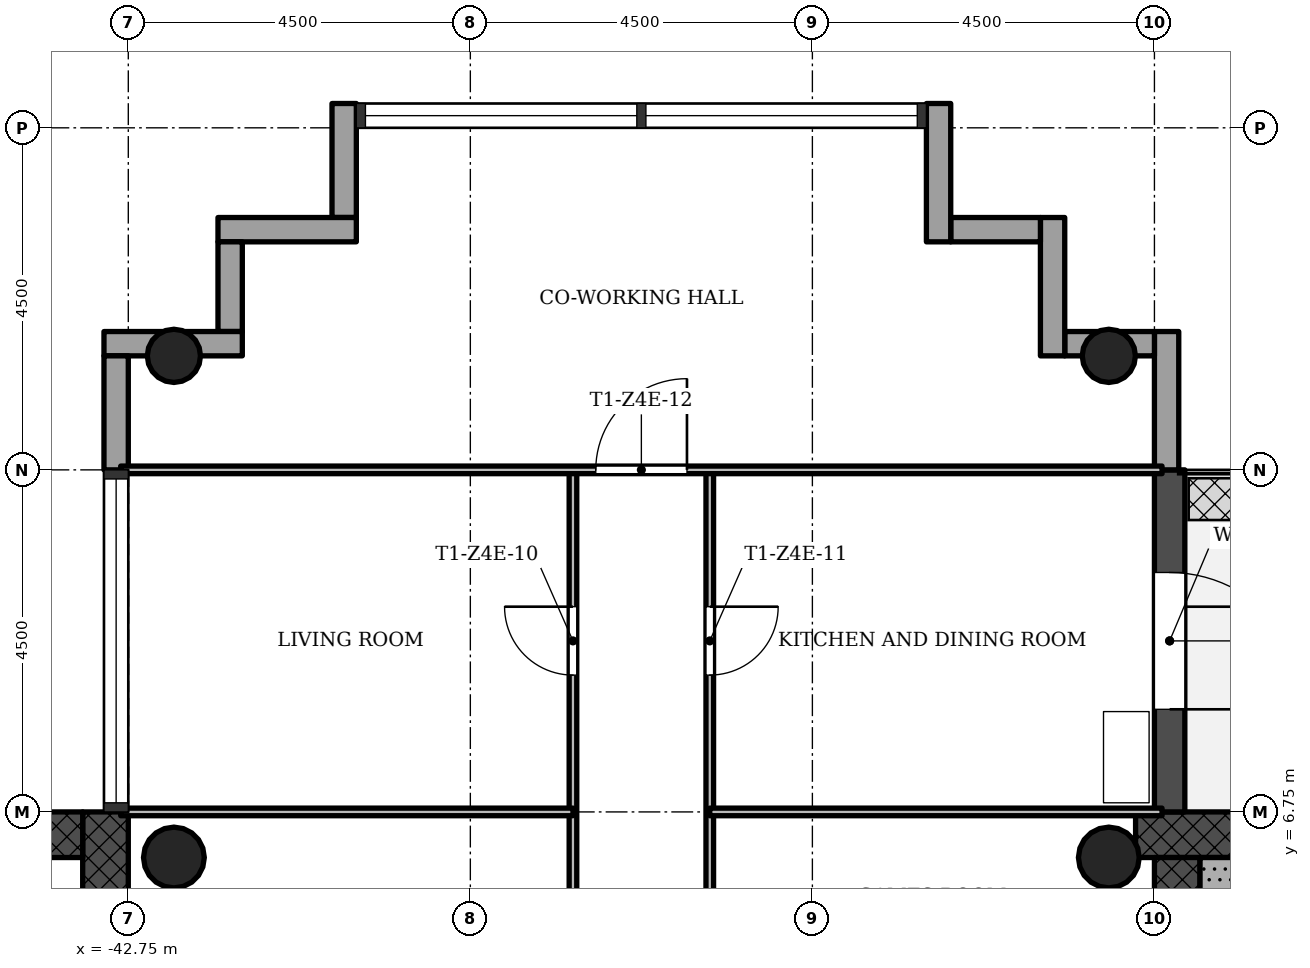
"""IFC4 building model, lengths in metres.
Left out: names, types, materials, properties, quantities, classifications, styles, units other than length and angle.
Written with IfcOpenShell. Run it as: python <this file> out.ifc"""

import sys

from ifc_helpers import new_model, si_unit, direction, frame, frame_2d, origin, origin_2d, place, context, subcontext, project, spatial, rectangle, hollow_circle, extrude, element, fill, save


model = new_model("IFC4")
c1 = context("Model", 3, precision=1e-05, world=origin(), true_north=direction((0.0, 1.0)))
c2 = subcontext(c1, "Body", "Model", "MODEL_VIEW")
j1 = project(units=[si_unit("LENGTHUNIT", "METRE"), si_unit("PLANEANGLEUNIT", "RADIAN")], contexts=[c1])
p1 = place(None, origin())
s1 = spatial("IfcSite", under=j1, at=p1, CompositionType="ELEMENT")
p2 = place(p1, origin())
s2 = spatial("IfcBuilding", under=s1, at=p2, CompositionType="ELEMENT")
p3 = place(p2, frame((0.0, 0.0, 206.2)))
s3 = spatial("IfcBuildingStorey", under=s2, at=p3, CompositionType="ELEMENT", Elevation=206.2)
p4 = place(p3, frame((-20.602, 6.45, 0.0), z_axis=(0.0, 0.0, 1.0), x_axis=(-1.0, 0.0, 0.0)))
e1 = element("IfcWall", 1, at=p4, inside=s3, PredefinedType="SHEAR", context=c2, shape_type="SweptSolid", body=[
    extrude(rectangle(XDim=8.896, YDim=0.6, at=frame_2d((4.448, 0.0))), origin(), (0.0, 0.0, 1.0), 3.4),
])
p5 = place(p3, frame((-28.95, 6.15, 0.0), z_axis=(0.0, 0.0, 1.0), x_axis=(0.0, -1.0, 0.0)))
e2 = element("IfcWall", 2, at=p5, inside=s3, PredefinedType="SHEAR", context=c2, shape_type="SweptSolid", body=[
    extrude(rectangle(XDim=12.9, YDim=0.6, at=frame_2d((6.45, 0.0))), origin(), (0.0, 0.0, 1.0), 3.4),
])
p6 = place(p5, frame((5.25, 0.0, 0.0)))
e3 = element("IfcOpeningElement", 3, at=p6, cuts=e2, PredefinedType="OPENING", context=c2, shape_type="SweptSolid", body=[
    extrude(rectangle(XDim=1.8, YDim=2.1, at=frame_2d((0.9, 1.05))), frame((0.0, 0.31, 0.0), z_axis=(0.0, -1.0, 0.0), x_axis=(1.0, 0.0, 0.0)), (0.0, 0.0, 1.0), 0.62),
])
p7 = place(p3, frame((-43.05, -6.15, 0.0), z_axis=(0.0, 0.0, 1.0), x_axis=(0.0, 1.0, 0.0)))
e4 = element("IfcWall", 4, at=p7, inside=s3, PredefinedType="SHEAR", context=c2, shape_type="SweptSolid", body=[
    extrude(rectangle(XDim=12.9, YDim=0.6, at=frame_2d((6.45, 0.0))), origin(), (0.0, 0.0, 1.0), 3.4),
])
p8 = place(p7, frame((5.25, 0.0, 0.0)))
e5 = element("IfcOpeningElement", 5, at=p8, cuts=e4, PredefinedType="OPENING", context=c2, shape_type="SweptSolid", body=[
    extrude(rectangle(XDim=1.8, YDim=2.1, at=frame_2d((0.9, 1.05))), frame((0.0, 0.31, 0.0), z_axis=(0.0, -1.0, 0.0), x_axis=(1.0, 0.0, 0.0)), (0.0, 0.0, 1.0), 0.62),
])
p9 = place(p3, frame((-43.35, 6.45, 0.0), z_axis=(0.0, 0.0, 1.0), x_axis=(-1.0, 0.0, 0.0)))
e6 = element("IfcWall", 6, at=p9, inside=s3, PredefinedType="SHEAR", context=c2, shape_type="SweptSolid", body=[
    extrude(rectangle(XDim=8.4, YDim=0.6, at=frame_2d((4.2, 0.0))), origin(), (0.0, 0.0, 1.0), 3.4),
])
for number, where, z_axis, x_axis in (
    (7, (-29.85, 12.75, 0.0), (0.0, 0.0, 1.0), (1.0, 0.0, 0.0)),
    (8, (-42.15, 12.75, 0.0), (0.0, 0.0, 1.0), (1.0, 0.0, 0.0)),
):
    element("IfcColumn", number, at=place(p3, frame(where, z_axis=z_axis, x_axis=x_axis)), inside=s3, PredefinedType="COLUMN", context=c2, shape_type="SweptSolid", body=[
        extrude(hollow_circle(Radius=0.35, WallThickness=0.025, at=origin_2d()), origin(), (0.0, 0.0, 1.0), 3.4),
    ])
for number, where, z_axis, x_axis in (
    (9, (-29.85, 6.15, 0.0), (0.0, 0.0, 1.0), (1.0, 0.0, 0.0)),
    (10, (-42.15, 6.15, 0.0), (0.0, 0.0, 1.0), (1.0, 0.0, 0.0)),
):
    element("IfcColumn", number, at=place(p3, frame(where, z_axis=z_axis, x_axis=x_axis)), inside=s3, PredefinedType="COLUMN", context=c2, shape_type="SweptSolid", body=[
        extrude(hollow_circle(Radius=0.4, WallThickness=0.028, at=origin_2d()), origin(), (0.0, 0.0, 1.0), 3.4),
    ])
p10 = place(p3, frame((-29.05, 6.75, -0.02), z_axis=(0.0, 0.0, 1.0), x_axis=(0.0, 1.0, 0.0)))
e11 = element("IfcWall", 11, at=p10, inside=s3, PredefinedType="STANDARD", context=c2, shape_type="SweptSolid", body=[
    extrude(rectangle(XDim=4.5, YDim=0.4, at=frame_2d((2.25, 0.0))), origin(), (0.0, 0.0, 1.0), 3.12),
])
p11 = place(p10, frame((1.35, 0.0, 0.02)))
e12 = element("IfcOpeningElement", 12, at=p11, cuts=e11, PredefinedType="OPENING", context=c2, shape_type="SweptSolid", body=[
    extrude(rectangle(XDim=1.8, YDim=2.1, at=frame_2d((0.9, 1.05))), frame((0.0, 0.21, 0.0), z_axis=(0.0, -1.0, 0.0), x_axis=(1.0, 0.0, 0.0)), (0.0, 0.0, 1.0), 0.42),
])
p12 = place(p3, frame((-29.09, 11.25, -0.3), z_axis=(0.0, 0.0, 1.0), x_axis=(0.0, 1.0, 0.0)))
e13 = element("IfcWall", 13, at=p12, inside=s3, PredefinedType="STANDARD", context=c2, shape_type="SweptSolid", body=[
    extrude(rectangle(XDim=1.82, YDim=0.32, at=frame_2d((0.91, 0.0))), origin(), (0.0, 0.0, 1.0), 3.4),
])
p13 = place(p3, frame((-29.25, 12.91, -0.3), z_axis=(0.0, 0.0, 1.0), x_axis=(-1.0, 0.0, 0.0)))
e14 = element("IfcWall", 14, at=p13, inside=s3, PredefinedType="STANDARD", context=c2, shape_type="SweptSolid", body=[
    extrude(rectangle(XDim=1.18, YDim=0.32, at=frame_2d((0.59, 0.0))), origin(), (0.0, 0.0, 1.0), 3.4),
])
p14 = place(p3, frame((-30.59, 12.75, -0.3), z_axis=(0.0, 0.0, 1.0), x_axis=(0.0, 1.0, 0.0)))
e15 = element("IfcWall", 15, at=p14, inside=s3, PredefinedType="STANDARD", context=c2, shape_type="SweptSolid", body=[
    extrude(rectangle(XDim=1.82, YDim=0.32, at=frame_2d((0.91, 0.0))), origin(), (0.0, 0.0, 1.0), 3.4),
])
p15 = place(p3, frame((-30.75, 14.41, -0.3), z_axis=(0.0, 0.0, 1.0), x_axis=(-1.0, 0.0, 0.0)))
e16 = element("IfcWall", 16, at=p15, inside=s3, PredefinedType="STANDARD", context=c2, shape_type="SweptSolid", body=[
    extrude(rectangle(XDim=1.18, YDim=0.32, at=frame_2d((0.59, 0.0))), origin(), (0.0, 0.0, 1.0), 3.4),
])
p16 = place(p3, frame((-32.09, 14.25, -0.3), z_axis=(0.0, 0.0, 1.0), x_axis=(0.0, 1.0, 0.0)))
e17 = element("IfcWall", 17, at=p16, inside=s3, PredefinedType="STANDARD", context=c2, shape_type="SweptSolid", body=[
    extrude(rectangle(XDim=1.82, YDim=0.32, at=frame_2d((0.91, 0.0))), origin(), (0.0, 0.0, 1.0), 3.4),
])
p17 = place(p3, frame((-39.91, 16.07, -0.3), z_axis=(0.0, 0.0, 1.0), x_axis=(0.0, -1.0, 0.0)))
e18 = element("IfcWall", 18, at=p17, inside=s3, PredefinedType="STANDARD", context=c2, shape_type="SweptSolid", body=[
    extrude(rectangle(XDim=1.5, YDim=0.32, at=frame_2d((0.75, 0.0))), origin(), (0.0, 0.0, 1.0), 3.4),
])
p18 = place(p3, frame((-39.75, 14.41, -0.3), z_axis=(0.0, 0.0, 1.0), x_axis=(-1.0, 0.0, 0.0)))
e19 = element("IfcWall", 19, at=p18, inside=s3, PredefinedType="STANDARD", context=c2, shape_type="SweptSolid", body=[
    extrude(rectangle(XDim=1.82, YDim=0.32, at=frame_2d((0.91, 0.0))), origin(), (0.0, 0.0, 1.0), 3.4),
])
p19 = place(p3, frame((-41.41, 14.25, -0.3), z_axis=(0.0, 0.0, 1.0), x_axis=(0.0, -1.0, 0.0)))
e20 = element("IfcWall", 20, at=p19, inside=s3, PredefinedType="STANDARD", context=c2, shape_type="SweptSolid", body=[
    extrude(rectangle(XDim=1.18, YDim=0.32, at=frame_2d((0.59, 0.0))), origin(), (0.0, 0.0, 1.0), 3.4),
])
p20 = place(p3, frame((-41.25, 12.91, -0.3), z_axis=(0.0, 0.0, 1.0), x_axis=(-1.0, 0.0, 0.0)))
e21 = element("IfcWall", 21, at=p20, inside=s3, PredefinedType="STANDARD", context=c2, shape_type="SweptSolid", body=[
    extrude(rectangle(XDim=1.82, YDim=0.32, at=frame_2d((0.91, 0.0))), origin(), (0.0, 0.0, 1.0), 3.4),
])
p21 = place(p3, frame((-42.91, 12.75, -0.3), z_axis=(0.0, 0.0, 1.0), x_axis=(0.0, -1.0, 0.0)))
e22 = element("IfcWall", 22, at=p21, inside=s3, PredefinedType="STANDARD", context=c2, shape_type="SweptSolid", body=[
    extrude(rectangle(XDim=1.5, YDim=0.32, at=frame_2d((0.75, 0.0))), origin(), (0.0, 0.0, 1.0), 3.4),
])
p22 = place(p3, frame((-36.9, 4.5, 0.0), z_axis=(0.0, 0.0, 1.0), x_axis=(0.0, 1.0, 0.0)))
e23 = element("IfcWall", 23, at=p22, inside=s3, PredefinedType="PARTITIONING", context=c2, shape_type="SweptSolid", body=[
    extrude(rectangle(XDim=6.75, YDim=0.1, at=frame_2d((3.375, 0.0))), origin(), (0.0, 0.0, 1.0), 3.0),
])
p23 = place(p22, frame((4.05, 0.0, 0.0)))
e24 = element("IfcOpeningElement", 24, at=p23, cuts=e23, PredefinedType="OPENING", context=c2, shape_type="SweptSolid", body=[
    extrude(rectangle(XDim=0.9, YDim=2.1, at=frame_2d((0.45, 1.05))), frame((0.0, 0.06, 0.0), z_axis=(0.0, -1.0, 0.0), x_axis=(1.0, 0.0, 0.0)), (0.0, 0.0, 1.0), 0.12),
])
p24 = place(p3, frame((-35.1, 4.5, 0.0), z_axis=(0.0, 0.0, 1.0), x_axis=(0.0, 1.0, 0.0)))
e25 = element("IfcWall", 25, at=p24, inside=s3, PredefinedType="PARTITIONING", context=c2, shape_type="SweptSolid", body=[
    extrude(rectangle(XDim=6.75, YDim=0.1, at=frame_2d((3.375, 0.0))), origin(), (0.0, 0.0, 1.0), 3.0),
])
p25 = place(p24, frame((4.05, 0.0, 0.0)))
e26 = element("IfcOpeningElement", 26, at=p25, cuts=e25, PredefinedType="OPENING", context=c2, shape_type="SweptSolid", body=[
    extrude(rectangle(XDim=0.9, YDim=2.1, at=frame_2d((0.45, 1.05))), frame((0.0, 0.06, 0.0), z_axis=(0.0, -1.0, 0.0), x_axis=(1.0, 0.0, 0.0)), (0.0, 0.0, 1.0), 0.12),
])
for number, where, z_axis, x_axis in (
    (27, (-42.85, 6.75, 0.0), (0.0, 0.0, 1.0), (1.0, 0.0, 0.0)),
    (28, (-35.1, 6.75, 0.0), (0.0, 0.0, 1.0), (1.0, 0.0, 0.0)),
):
    element("IfcWall", number, at=place(p3, frame(where, z_axis=z_axis, x_axis=x_axis)), inside=s3, PredefinedType="PARTITIONING", context=c2, shape_type="SweptSolid", body=[
        extrude(rectangle(XDim=5.95, YDim=0.1, at=frame_2d((2.975, 0.0))), origin(), (0.0, 0.0, 1.0), 3.0),
    ])
p26 = place(p3, frame((-42.85, 11.25, 0.0), z_axis=(0.0, 0.0, 1.0), x_axis=(1.0, 0.0, 0.0)))
e29 = element("IfcWall", 29, at=p26, inside=s3, PredefinedType="PARTITIONING", context=c2, shape_type="SweptSolid", body=[
    extrude(rectangle(XDim=13.7, YDim=0.1, at=frame_2d((6.85, 0.0))), origin(), (0.0, 0.0, 1.0), 3.0),
])
p27 = place(p26, frame((6.25, 0.0, 0.0)))
e30 = element("IfcOpeningElement", 30, at=p27, cuts=e29, PredefinedType="OPENING", context=c2, shape_type="SweptSolid", body=[
    extrude(rectangle(XDim=1.2, YDim=2.1, at=frame_2d((0.6, 1.05))), frame((0.0, 0.06, 0.0), z_axis=(0.0, -1.0, 0.0), x_axis=(1.0, 0.0, 0.0)), (0.0, 0.0, 1.0), 0.12),
])
p28 = place(p3, frame((-28.35, 1.85, 0.0), z_axis=(0.0, 0.0, 1.0), x_axis=(0.0, 1.0, 0.0)))
e31 = element("IfcWall", 31, at=p28, inside=s3, PredefinedType="SHEAR", context=c2, shape_type="SweptSolid", body=[
    extrude(rectangle(XDim=4.3, YDim=0.6, at=frame_2d((2.15, 0.0))), origin(), (0.0, 0.0, 1.0), 3.4),
])
p29 = place(p11, origin())
e32 = element("IfcDoor", 32, at=p29, inside=s3, OperationType="SINGLE_SWING_LEFT", PredefinedType="DOOR", context=c2, shape_type="SweptSolid", body=[
    extrude(rectangle(XDim=1.8, YDim=2.1, at=frame_2d((0.9, 1.05))), frame((0.0, 0.025, 0.0), z_axis=(0.0, -1.0, 0.0), x_axis=(1.0, 0.0, 0.0)), (0.0, 0.0, 1.0), 0.05),
])
fill(e12, e32)
p30 = place(p23, origin())
e33 = element("IfcDoor", 33, at=p30, inside=s3, OperationType="SINGLE_SWING_LEFT", PredefinedType="DOOR", context=c2, shape_type="SweptSolid", body=[
    extrude(rectangle(XDim=0.9, YDim=2.1, at=frame_2d((0.45, 1.05))), frame((0.0, 0.025, 0.0), z_axis=(0.0, -1.0, 0.0), x_axis=(1.0, 0.0, 0.0)), (0.0, 0.0, 1.0), 0.05),
])
fill(e24, e33)
p31 = place(p25, origin())
e34 = element("IfcDoor", 34, at=p31, inside=s3, OperationType="SINGLE_SWING_RIGHT", PredefinedType="DOOR", context=c2, shape_type="SweptSolid", body=[
    extrude(rectangle(XDim=0.9, YDim=2.1, at=frame_2d((0.45, 1.05))), frame((0.0, 0.025, 0.0), z_axis=(0.0, -1.0, 0.0), x_axis=(1.0, 0.0, 0.0)), (0.0, 0.0, 1.0), 0.05),
])
fill(e26, e34)
p32 = place(p27, origin())
e35 = element("IfcDoor", 35, at=p32, inside=s3, OperationType="SINGLE_SWING_LEFT", PredefinedType="DOOR", context=c2, shape_type="SweptSolid", body=[
    extrude(rectangle(XDim=1.2, YDim=2.1, at=frame_2d((0.6, 1.05))), frame((0.0, 0.025, 0.0), z_axis=(0.0, -1.0, 0.0), x_axis=(1.0, 0.0, 0.0)), (0.0, 0.0, 1.0), 0.05),
])
fill(e30, e35)
save(model, sys.argv[1])
